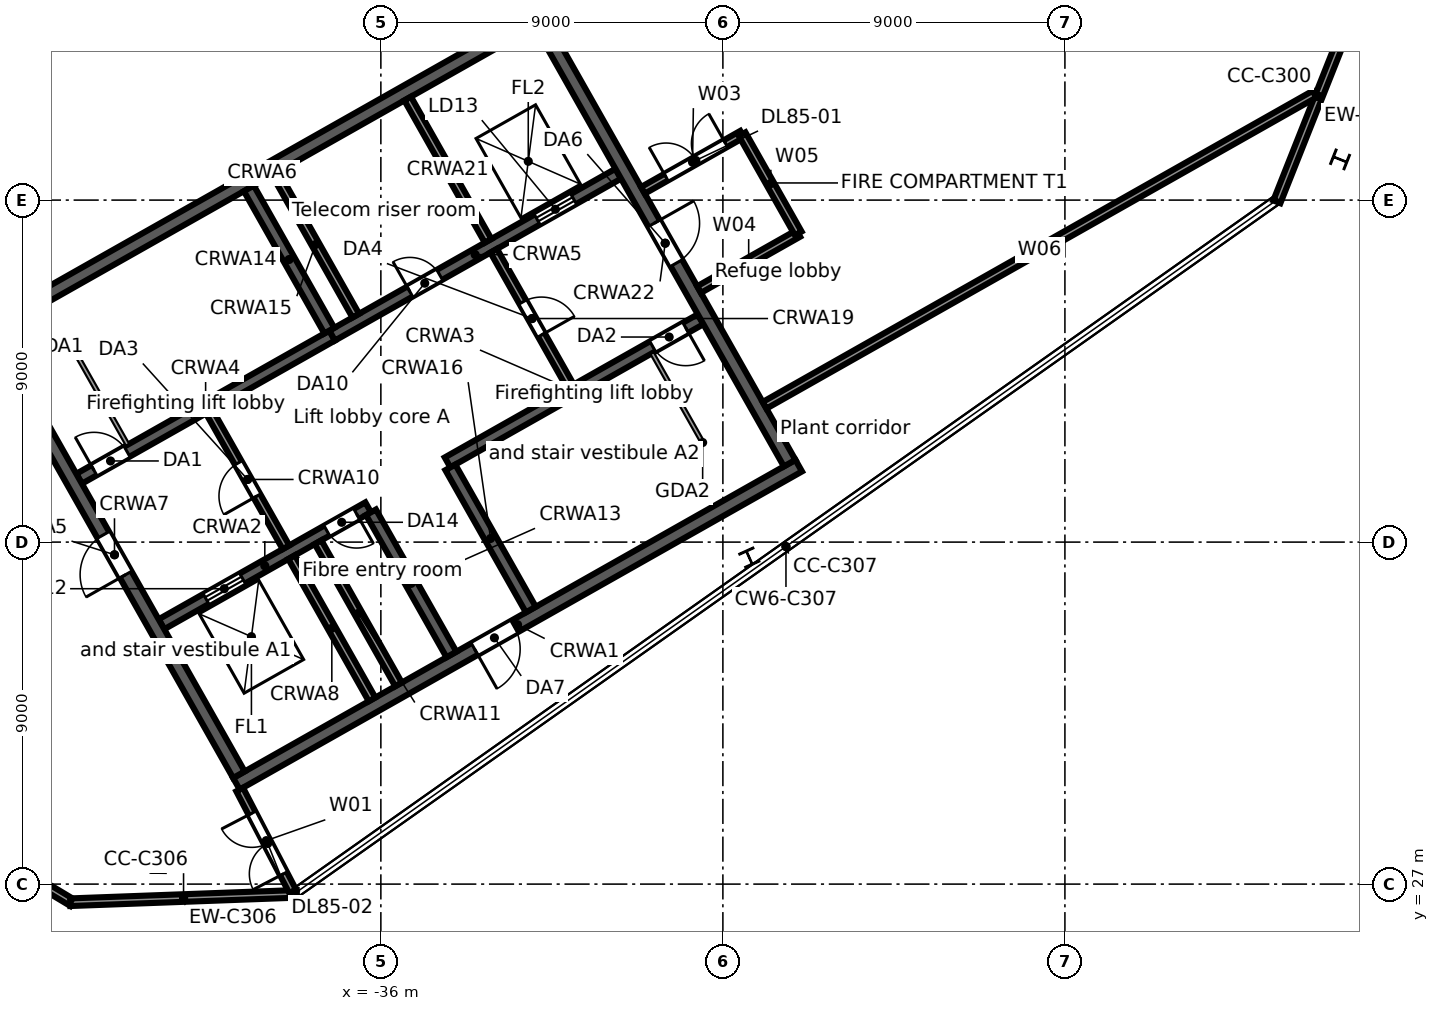
"""IFC4 building model, lengths in metres.
Left out: names, types, materials, properties, quantities, classifications, styles, units other than length and angle.
Written with IfcOpenShell. Run it as: python <this file> out.ifc"""

import sys

from ifc_helpers import new_model, si_unit, direction, frame, frame_2d, origin, origin_2d, place, context, subcontext, project, spatial, rectangle, i_section, extrude, element, fill, save


model = new_model("IFC4")
c1 = context("Model", 3, precision=1e-05, world=origin(), true_north=direction((0.0, 1.0)))
c2 = subcontext(c1, "Body", "Model", "MODEL_VIEW")
j1 = project(units=[si_unit("LENGTHUNIT", "METRE"), si_unit("PLANEANGLEUNIT", "RADIAN")], contexts=[c1])
p1 = place(None, origin())
s1 = spatial("IfcSite", under=j1, at=p1, CompositionType="ELEMENT")
p2 = place(p1, origin())
s2 = spatial("IfcBuilding", under=s1, at=p2, CompositionType="ELEMENT")
p3 = place(p2, frame((0.0, 0.0, 368.5)))
s3 = spatial("IfcBuildingStorey", under=s2, at=p3, CompositionType="ELEMENT", Elevation=368.5)
for number, where, z_axis, x_axis in (
    (1, (-41.858, 27.495, 0.0), (0.0, 0.0, 1.0), (1.0, -0.013, 0.0)),
    (2, (-10.76, 46.071, 0.0), (0.0, 0.0, 1.0), (0.369, 0.929, 0.0)),
    (3, (-26.305, 35.591, 0.0), (0.0, 0.0, 1.0), (0.911, 0.413, 0.0)),
):
    element("IfcColumn", number, at=place(p3, frame(where, z_axis=z_axis, x_axis=x_axis)), inside=s3, PredefinedType="COLUMN", context=c2, shape_type="SweptSolid", body=[
        extrude(i_section(OverallWidth=0.4, OverallDepth=0.4, WebThickness=0.013, FlangeThickness=0.021, FilletRadius=0.022, at=origin_2d()), origin(), (0.0, 0.0, 1.0), 3.3),
    ])
p4 = place(p3, frame((-10.22, 50.501, 0.0), z_axis=(0.0, 0.0, 1.0), x_axis=(-0.369026712049, -0.929418789241, 0.0)))
e4 = element("IfcWall", 4, at=p4, inside=s3, PredefinedType="STANDARD", context=c2, shape_type="SweptSolid", body=[
    extrude(rectangle(XDim=5.968, YDim=0.2, at=frame_2d((2.984, 0.0))), origin(), (0.0, 0.0, 1.0), 2.85),
])
p5 = place(p3, frame((-44.119, 26.509, 0.0), z_axis=(0.0, 0.0, 1.0), x_axis=(-0.857168693653, 0.515035756644, 0.0)))
e5 = element("IfcWall", 5, at=p5, inside=s3, PredefinedType="STANDARD", context=c2, shape_type="SweptSolid", body=[
    extrude(rectangle(XDim=17.084, YDim=0.2, at=frame_2d((8.542, 0.0))), origin(), (0.0, 0.0, 1.0), 3.6),
])
p6 = place(p3, frame((-38.21, 26.744, 0.0), z_axis=(0.0, 0.0, 1.0), x_axis=(-0.999319030106, -0.036898185155, 0.0)))
e6 = element("IfcWall", 6, at=p6, inside=s3, PredefinedType="STANDARD", context=c2, shape_type="SweptSolid", body=[
    extrude(rectangle(XDim=5.968, YDim=0.2, at=frame_2d((2.984, 0.0))), origin(), (0.0, 0.0, 1.0), 3.6),
])
p7 = place(p3, frame((-39.801, 29.64, 0.0), z_axis=(0.0, 0.0, 1.0), x_axis=(0.870359753402, 0.492416388494, 0.0)))
e7 = element("IfcWall", 7, at=p7, inside=s3, PredefinedType="SOLIDWALL", context=c2, shape_type="SweptSolid", body=[
    extrude(rectangle(XDim=17.0, YDim=0.35, at=frame_2d((8.5, 0.0))), origin(), (0.0, 0.0, 1.0), 3.3),
])
p8 = place(p7, frame((7.2, 0.0, 0.0)))
e8 = element("IfcOpeningElement", 8, at=p8, cuts=e7, PredefinedType="OPENING", context=c2, shape_type="SweptSolid", body=[
    extrude(rectangle(XDim=1.2, YDim=2.1, at=frame_2d((0.6, 1.05))), frame((0.0, 0.185, 0.0), z_axis=(0.0, -1.0, 0.0), x_axis=(1.0, 0.0, 0.0)), (0.0, 0.0, 1.0), 0.37),
])
p9 = place(p3, frame((-41.774, 33.838, 0.0), z_axis=(0.0, 0.0, 1.0), x_axis=(0.870355415866, 0.492424055132, 0.0)))
e9 = element("IfcWall", 9, at=p9, inside=s3, PredefinedType="SOLIDWALL", context=c2, shape_type="SweptSolid", body=[
    extrude(rectangle(XDim=6.25, YDim=0.3, at=frame_2d((3.125, 0.0))), origin(), (0.0, 0.0, 1.0), 3.3),
])
p10 = place(p9, frame((1.35, 0.0, 0.0)))
e10 = element("IfcOpeningElement", 10, at=p10, cuts=e9, PredefinedType="OPENING", context=c2, shape_type="SweptSolid", body=[
    extrude(rectangle(XDim=1.1, YDim=2.1, at=frame_2d((0.55, 1.05))), frame((0.0, 0.16, 0.0), z_axis=(0.0, -1.0, 0.0), x_axis=(1.0, 0.0, 0.0)), (0.0, 0.0, 1.0), 0.32),
])
p11 = place(p9, frame((5.0, 0.0, 0.0)))
e11 = element("IfcOpeningElement", 11, at=p11, cuts=e9, PredefinedType="OPENING", context=c2, shape_type="SweptSolid", body=[
    extrude(rectangle(XDim=0.9, YDim=2.1, at=frame_2d((0.45, 1.05))), frame((0.0, 0.16, 0.0), z_axis=(0.0, -1.0, 0.0), x_axis=(1.0, 0.0, 0.0)), (0.0, 0.0, 1.0), 0.32),
])
p12 = place(p3, frame((-34.245, 38.097, 0.0), z_axis=(0.0, 0.0, 1.0), x_axis=(0.870352347706, 0.49242947804, 0.0)))
e12 = element("IfcWall", 12, at=p12, inside=s3, PredefinedType="SOLIDWALL", context=c2, shape_type="SweptSolid", body=[
    extrude(rectangle(XDim=7.65, YDim=0.3, at=frame_2d((3.825, 0.0))), origin(), (0.0, 0.0, 1.0), 3.3),
])
p13 = place(p12, frame((6.2, 0.0, 0.0)))
e13 = element("IfcOpeningElement", 13, at=p13, cuts=e12, PredefinedType="OPENING", context=c2, shape_type="SweptSolid", body=[
    extrude(rectangle(XDim=1.0, YDim=2.1, at=frame_2d((0.5, 1.05))), frame((0.0, 0.16, 0.0), z_axis=(0.0, -1.0, 0.0), x_axis=(1.0, 0.0, 0.0)), (0.0, 0.0, 1.0), 0.32),
])
p14 = place(p3, frame((-43.94, 37.667, 0.0), z_axis=(0.0, 0.0, 1.0), x_axis=(0.870352347706, 0.49242947804, 0.0)))
e14 = element("IfcWall", 14, at=p14, inside=s3, PredefinedType="SOLIDWALL", context=c2, shape_type="SweptSolid", body=[
    extrude(rectangle(XDim=7.65, YDim=0.3, at=frame_2d((3.825, 0.0))), origin(), (0.0, 0.0, 1.0), 3.3),
])
p15 = place(p14, frame((0.45, 0.0, 0.0)))
e15 = element("IfcOpeningElement", 15, at=p15, cuts=e14, PredefinedType="OPENING", context=c2, shape_type="SweptSolid", body=[
    extrude(rectangle(XDim=1.0, YDim=2.1, at=frame_2d((0.5, 1.05))), frame((0.0, 0.16, 0.0), z_axis=(0.0, -1.0, 0.0), x_axis=(1.0, 0.0, 0.0)), (0.0, 0.0, 1.0), 0.32),
])
p16 = place(p3, frame((-37.282, 41.435, 0.0), z_axis=(0.0, 0.0, 1.0), x_axis=(0.870364588774, 0.492407841741, 0.0)))
e16 = element("IfcWall", 16, at=p16, inside=s3, PredefinedType="SOLIDWALL", context=c2, shape_type="SweptSolid", body=[
    extrude(rectangle(XDim=8.65, YDim=0.3, at=frame_2d((4.325, 0.0))), origin(), (0.0, 0.0, 1.0), 3.3),
])
p17 = place(p16, frame((6.2, 0.0, 0.0)))
e17 = element("IfcOpeningElement", 17, at=p17, cuts=e16, PredefinedType="OPENING", context=c2, shape_type="SweptSolid", body=[
    extrude(rectangle(XDim=1.1, YDim=2.1, at=frame_2d((0.55, 1.05))), frame((0.0, 0.16, 0.0), z_axis=(0.0, -1.0, 0.0), x_axis=(1.0, 0.0, 0.0)), (0.0, 0.0, 1.0), 0.32),
])
p18 = place(p16, frame((2.35, 0.0, 0.0)))
e18 = element("IfcOpeningElement", 18, at=p18, cuts=e16, PredefinedType="OPENING", context=c2, shape_type="SweptSolid", body=[
    extrude(rectangle(XDim=0.9, YDim=2.1, at=frame_2d((0.45, 1.05))), frame((0.0, 0.16, 0.0), z_axis=(0.0, -1.0, 0.0), x_axis=(1.0, 0.0, 0.0)), (0.0, 0.0, 1.0), 0.32),
])
p19 = place(p3, frame((-46.522, 41.521, 0.0), z_axis=(0.0, 0.0, 1.0), x_axis=(0.870359753402, 0.492416388494, 0.0)))
e19 = element("IfcWall", 19, at=p19, inside=s3, PredefinedType="SOLIDWALL", context=c2, shape_type="SweptSolid", body=[
    extrude(rectangle(XDim=17.0, YDim=0.35, at=frame_2d((8.5, 0.0))), origin(), (0.0, 0.0, 1.0), 3.3),
])
p20 = place(p3, frame((-46.284, 41.454, 0.0), z_axis=(0.0, 0.0, 1.0), x_axis=(0.492429810477, -0.870352159619, 0.0)))
e20 = element("IfcWall", 20, at=p20, inside=s3, PredefinedType="SOLIDWALL", context=c2, shape_type="SweptSolid", body=[
    extrude(rectangle(XDim=13.3, YDim=0.35, at=frame_2d((6.65, 0.0))), origin(), (0.0, 0.0, 1.0), 3.3),
])
p21 = place(p20, frame((6.05, 0.0, 0.0)))
e21 = element("IfcOpeningElement", 21, at=p21, cuts=e20, PredefinedType="OPENING", context=c2, shape_type="SweptSolid", body=[
    extrude(rectangle(XDim=1.2, YDim=2.1, at=frame_2d((0.6, 1.05))), frame((0.0, 0.185, 0.0), z_axis=(0.0, -1.0, 0.0), x_axis=(1.0, 0.0, 0.0)), (0.0, 0.0, 1.0), 0.37),
])
p22 = place(p3, frame((-38.349, 35.603, 0.0), z_axis=(0.0, 0.0, 1.0), x_axis=(0.492410799949, -0.870362915164, 0.0)))
e22 = element("IfcWall", 22, at=p22, inside=s3, PredefinedType="SOLIDWALL", context=c2, shape_type="SweptSolid", body=[
    extrude(rectangle(XDim=4.3, YDim=0.2, at=frame_2d((2.15, 0.0))), origin(), (0.0, 0.0, 1.0), 3.3),
])
p23 = place(p3, frame((-40.516, 39.433, 0.0), z_axis=(0.0, 0.0, 1.0), x_axis=(0.492453559952, -0.87033872216, 0.0)))
e23 = element("IfcWall", 23, at=p23, inside=s3, PredefinedType="PARTITIONING", context=c2, shape_type="SweptSolid", body=[
    extrude(rectangle(XDim=4.1, YDim=0.2, at=frame_2d((2.05, 0.0))), origin(), (0.0, 0.0, 1.0), 3.3),
])
p24 = place(p23, frame((1.55, 0.0, 0.0)))
e24 = element("IfcOpeningElement", 24, at=p24, cuts=e23, PredefinedType="OPENING", context=c2, shape_type="SweptSolid", body=[
    extrude(rectangle(XDim=1.0, YDim=2.1, at=frame_2d((0.5, 1.05))), frame((0.0, 0.11, 0.0), z_axis=(0.0, -1.0, 0.0), x_axis=(1.0, 0.0, 0.0)), (0.0, 0.0, 1.0), 0.22),
])
p25 = place(p3, frame((-37.653, 35.997, 0.0), z_axis=(0.0, 0.0, 1.0), x_axis=(0.492435133428, -0.870349147967, 0.0)))
e25 = element("IfcWall", 25, at=p25, inside=s3, PredefinedType="SOLIDWALL", context=c2, shape_type="SweptSolid", body=[
    extrude(rectangle(XDim=4.3, YDim=0.2, at=frame_2d((2.15, 0.0))), origin(), (0.0, 0.0, 1.0), 3.3),
])
p26 = place(p3, frame((-36.26, 36.785, 0.0), z_axis=(0.0, 0.0, 1.0), x_axis=(0.492435133428, -0.870349147967, 0.0)))
e26 = element("IfcWall", 26, at=p26, inside=s3, PredefinedType="SOLIDWALL", context=c2, shape_type="SweptSolid", body=[
    extrude(rectangle(XDim=4.3, YDim=0.3, at=frame_2d((2.15, 0.0))), origin(), (0.0, 0.0, 1.0), 3.3),
])
p27 = place(p3, frame((-39.473, 45.308, 0.0), z_axis=(0.0, 0.0, 1.0), x_axis=(0.492410799949, -0.870362915164, 0.0)))
e27 = element("IfcWall", 27, at=p27, inside=s3, PredefinedType="SOLIDWALL", context=c2, shape_type="SweptSolid", body=[
    extrude(rectangle(XDim=4.3, YDim=0.3, at=frame_2d((2.15, 0.0))), origin(), (0.0, 0.0, 1.0), 3.3),
])
p28 = place(p3, frame((-38.777, 45.701, 0.0), z_axis=(0.0, 0.0, 1.0), x_axis=(0.492435133428, -0.870349147967, 0.0)))
e28 = element("IfcWall", 28, at=p28, inside=s3, PredefinedType="SOLIDWALL", context=c2, shape_type="SweptSolid", body=[
    extrude(rectangle(XDim=4.3, YDim=0.2, at=frame_2d((2.15, 0.0))), origin(), (0.0, 0.0, 1.0), 3.3),
])
p29 = place(p3, frame((-34.171, 37.967, 0.0), z_axis=(0.0, 0.0, 1.0), x_axis=(0.492435133428, -0.870349147967, 0.0)))
e29 = element("IfcWall", 29, at=p29, inside=s3, PredefinedType="SOLIDWALL", context=c2, shape_type="SweptSolid", body=[
    extrude(rectangle(XDim=4.3, YDim=0.3, at=frame_2d((2.15, 0.0))), origin(), (0.0, 0.0, 1.0), 3.3),
])
p30 = place(p3, frame((-33.031, 43.667, 0.0), z_axis=(0.0, 0.0, 1.0), x_axis=(0.492408451753, -0.87036424366, 0.0)))
e30 = element("IfcWall", 30, at=p30, inside=s3, PredefinedType="PARTITIONING", context=c2, shape_type="SweptSolid", body=[
    extrude(rectangle(XDim=4.1, YDim=0.2, at=frame_2d((2.05, 0.0))), origin(), (0.0, 0.0, 1.0), 3.3),
])
p31 = place(p30, frame((1.55, 0.0, 0.0)))
e31 = element("IfcOpeningElement", 31, at=p31, cuts=e30, PredefinedType="OPENING", context=c2, shape_type="SweptSolid", body=[
    extrude(rectangle(XDim=1.0, YDim=2.1, at=frame_2d((0.5, 1.05))), frame((0.0, 0.11, 0.0), z_axis=(0.0, -1.0, 0.0), x_axis=(1.0, 0.0, 0.0)), (0.0, 0.0, 1.0), 0.22),
])
p32 = place(p3, frame((-35.296, 47.671, 0.0), z_axis=(0.0, 0.0, 1.0), x_axis=(0.492435133428, -0.870349147967, 0.0)))
e32 = element("IfcWall", 32, at=p32, inside=s3, PredefinedType="SOLIDWALL", context=c2, shape_type="SweptSolid", body=[
    extrude(rectangle(XDim=4.3, YDim=0.2, at=frame_2d((2.15, 0.0))), origin(), (0.0, 0.0, 1.0), 3.3),
])
p33 = place(p3, frame((-31.792, 49.653, 0.0), z_axis=(0.0, 0.0, 1.0), x_axis=(0.492421943245, -0.870356610712, 0.0)))
e33 = element("IfcWall", 33, at=p33, inside=s3, PredefinedType="SOLIDWALL", context=c2, shape_type="SweptSolid", body=[
    extrude(rectangle(XDim=13.3, YDim=0.35, at=frame_2d((6.65, 0.0))), origin(), (0.0, 0.0, 1.0), 3.3),
])
p34 = place(p33, frame((6.05, 0.0, 0.0)))
e34 = element("IfcOpeningElement", 34, at=p34, cuts=e33, PredefinedType="OPENING", context=c2, shape_type="SweptSolid", body=[
    extrude(rectangle(XDim=1.2, YDim=2.1, at=frame_2d((0.6, 1.05))), frame((0.0, 0.185, 0.0), z_axis=(0.0, -1.0, 0.0), x_axis=(1.0, 0.0, 0.0)), (0.0, 0.0, 1.0), 0.37),
])
p35 = place(p3, frame((-39.715, 29.488, 0.0), z_axis=(0.0, 0.0, 1.0), x_axis=(0.461720517785, -0.887025458178, 0.0)))
e35 = element("IfcWall", 35, at=p35, inside=s3, PredefinedType="PARTITIONING", context=c2, shape_type="SweptSolid", body=[
    extrude(rectangle(XDim=3.03, YDim=0.2, at=frame_2d((1.515, 0.0))), origin(), (0.0, 0.0, 1.0), 3.3),
])
p36 = place(p35, frame((0.7, 0.0, 0.0)))
e36 = element("IfcOpeningElement", 36, at=p36, cuts=e35, PredefinedType="OPENING", context=c2, shape_type="SweptSolid", body=[
    extrude(rectangle(XDim=1.8, YDim=2.1, at=frame_2d((0.9, 1.05))), frame((0.0, 0.11, 0.0), z_axis=(0.0, -1.0, 0.0), x_axis=(1.0, 0.0, 0.0)), (0.0, 0.0, 1.0), 0.22),
])
p37 = place(p3, frame((-29.104, 45.257, 0.0), z_axis=(0.0, 0.0, 1.0), x_axis=(0.870423351516, 0.492303960105, 0.0)))
e37 = element("IfcWall", 37, at=p37, inside=s3, PredefinedType="PARTITIONING", context=c2, shape_type="SweptSolid", body=[
    extrude(rectangle(XDim=3.0, YDim=0.2, at=frame_2d((1.5, 0.0))), origin(), (0.0, 0.0, 1.0), 3.3),
])
p38 = place(p37, frame((0.7, 0.0, 0.0)))
e38 = element("IfcOpeningElement", 38, at=p38, cuts=e37, PredefinedType="OPENING", context=c2, shape_type="SweptSolid", body=[
    extrude(rectangle(XDim=1.8, YDim=2.1, at=frame_2d((0.9, 1.05))), frame((0.0, 0.11, 0.0), z_axis=(0.0, -1.0, 0.0), x_axis=(1.0, 0.0, 0.0)), (0.0, 0.0, 1.0), 0.22),
])
p39 = place(p3, frame((-27.627, 42.646, 0.0), z_axis=(0.0, 0.0, 1.0), x_axis=(0.870368744559, 0.492400496034, 0.0)))
e39 = element("IfcWall", 39, at=p39, inside=s3, PredefinedType="PARTITIONING", context=c2, shape_type="SweptSolid", body=[
    extrude(rectangle(XDim=3.0, YDim=0.2, at=frame_2d((1.5, 0.0))), origin(), (0.0, 0.0, 1.0), 3.3),
])
p40 = place(p3, frame((-26.493, 46.734, 0.0), z_axis=(0.0, 0.0, 1.0), x_axis=(0.492338837132, -0.870403624448, 0.0)))
e40 = element("IfcWall", 40, at=p40, inside=s3, PredefinedType="PARTITIONING", context=c2, shape_type="SweptSolid", body=[
    extrude(rectangle(XDim=3.0, YDim=0.2, at=frame_2d((1.5, 0.0))), origin(), (0.0, 0.0, 1.0), 3.3),
])
p41 = place(p3, frame((-25.904, 39.6, 0.0), z_axis=(0.0, 0.0, 1.0), x_axis=(0.870362303086, 0.49241188183, 0.0)))
e41 = element("IfcWall", 41, at=p41, inside=s3, PredefinedType="PARTITIONING", context=c2, shape_type="SweptSolid", body=[
    extrude(rectangle(XDim=16.626, YDim=0.2, at=frame_2d((8.313, 0.0))), origin(), (0.0, 0.0, 1.0), 3.3),
])
p42 = place(p17, origin())
e42 = element("IfcDoor", 42, at=p42, inside=s3, OperationType="DOUBLE_DOOR_SLIDING", PredefinedType="DOOR", context=c2, shape_type="SweptSolid", body=[
    extrude(rectangle(XDim=1.1, YDim=2.1, at=frame_2d((0.55, 1.05))), frame((0.0, 0.025, 0.0), z_axis=(0.0, -1.0, 0.0), x_axis=(1.0, 0.0, 0.0)), (0.0, 0.0, 1.0), 0.05),
])
fill(e17, e42)
p43 = place(p10, origin())
e43 = element("IfcDoor", 43, at=p43, inside=s3, OperationType="DOUBLE_DOOR_SLIDING", PredefinedType="DOOR", context=c2, shape_type="SweptSolid", body=[
    extrude(rectangle(XDim=1.1, YDim=2.1, at=frame_2d((0.55, 1.05))), frame((0.0, 0.025, 0.0), z_axis=(0.0, -1.0, 0.0), x_axis=(1.0, 0.0, 0.0)), (0.0, 0.0, 1.0), 0.05),
])
fill(e10, e43)
p44 = place(p15, origin())
e44 = element("IfcDoor", 44, at=p44, inside=s3, OperationType="SINGLE_SWING_LEFT", PredefinedType="DOOR", context=c2, shape_type="SweptSolid", body=[
    extrude(rectangle(XDim=1.0, YDim=2.1, at=frame_2d((0.5, 1.05))), frame((0.0, 0.025, 0.0), z_axis=(0.0, -1.0, 0.0), x_axis=(1.0, 0.0, 0.0)), (0.0, 0.0, 1.0), 0.05),
])
fill(e15, e44)
p45 = place(p13, frame((1.0, 0.0, 0.0), z_axis=(0.0, 0.0, 1.0), x_axis=(-1.0, 0.0, 0.0)))
e45 = element("IfcDoor", 45, at=p45, inside=s3, OperationType="SINGLE_SWING_LEFT", PredefinedType="DOOR", context=c2, shape_type="SweptSolid", body=[
    extrude(rectangle(XDim=1.0, YDim=2.1, at=frame_2d((0.5, 1.05))), frame((0.0, 0.025, 0.0), z_axis=(0.0, -1.0, 0.0), x_axis=(1.0, 0.0, 0.0)), (0.0, 0.0, 1.0), 0.05),
])
fill(e13, e45)
p46 = place(p24, frame((1.0, 0.0, 0.0), z_axis=(0.0, 0.0, 1.0), x_axis=(-1.0, 0.0, 0.0)))
e46 = element("IfcDoor", 46, at=p46, inside=s3, OperationType="SINGLE_SWING_LEFT", PredefinedType="DOOR", context=c2, shape_type="SweptSolid", body=[
    extrude(rectangle(XDim=1.0, YDim=2.1, at=frame_2d((0.5, 1.05))), frame((0.0, 0.025, 0.0), z_axis=(0.0, -1.0, 0.0), x_axis=(1.0, 0.0, 0.0)), (0.0, 0.0, 1.0), 0.05),
])
fill(e24, e46)
p47 = place(p21, frame((1.2, 0.0, 0.0), z_axis=(0.0, 0.0, 1.0), x_axis=(-1.0, 0.0, 0.0)))
e47 = element("IfcDoor", 47, at=p47, inside=s3, OperationType="SINGLE_SWING_LEFT", PredefinedType="DOOR", context=c2, shape_type="SweptSolid", body=[
    extrude(rectangle(XDim=1.2, YDim=2.1, at=frame_2d((0.6, 1.05))), frame((0.0, 0.025, 0.0), z_axis=(0.0, -1.0, 0.0), x_axis=(1.0, 0.0, 0.0)), (0.0, 0.0, 1.0), 0.05),
])
fill(e21, e47)
p48 = place(p31, origin())
e48 = element("IfcDoor", 48, at=p48, inside=s3, OperationType="SINGLE_SWING_RIGHT", PredefinedType="DOOR", context=c2, shape_type="SweptSolid", body=[
    extrude(rectangle(XDim=1.0, YDim=2.1, at=frame_2d((0.5, 1.05))), frame((0.0, 0.025, 0.0), z_axis=(0.0, -1.0, 0.0), x_axis=(1.0, 0.0, 0.0)), (0.0, 0.0, 1.0), 0.05),
])
fill(e31, e48)
p49 = place(p34, origin())
e49 = element("IfcDoor", 49, at=p49, inside=s3, OperationType="SINGLE_SWING_LEFT", PredefinedType="DOOR", context=c2, shape_type="SweptSolid", body=[
    extrude(rectangle(XDim=1.2, YDim=2.1, at=frame_2d((0.6, 1.05))), frame((0.0, 0.025, 0.0), z_axis=(0.0, -1.0, 0.0), x_axis=(1.0, 0.0, 0.0)), (0.0, 0.0, 1.0), 0.05),
])
fill(e34, e49)
p50 = place(p8, frame((1.2, 0.0, 0.0), z_axis=(0.0, 0.0, 1.0), x_axis=(-1.0, 0.0, 0.0)))
e50 = element("IfcDoor", 50, at=p50, inside=s3, OperationType="SINGLE_SWING_RIGHT", PredefinedType="DOOR", context=c2, shape_type="SweptSolid", body=[
    extrude(rectangle(XDim=1.2, YDim=2.1, at=frame_2d((0.6, 1.05))), frame((0.0, 0.025, 0.0), z_axis=(0.0, -1.0, 0.0), x_axis=(1.0, 0.0, 0.0)), (0.0, 0.0, 1.0), 0.05),
])
fill(e8, e50)
p51 = place(p18, origin())
e51 = element("IfcDoor", 51, at=p51, inside=s3, OperationType="SINGLE_SWING_LEFT", PredefinedType="DOOR", context=c2, shape_type="SweptSolid", body=[
    extrude(rectangle(XDim=0.9, YDim=2.1, at=frame_2d((0.45, 1.05))), frame((0.0, 0.025, 0.0), z_axis=(0.0, -1.0, 0.0), x_axis=(1.0, 0.0, 0.0)), (0.0, 0.0, 1.0), 0.05),
])
fill(e18, e51)
p52 = place(p11, frame((0.9, 0.0, 0.0), z_axis=(0.0, 0.0, 1.0), x_axis=(-1.0, 0.0, 0.0)))
e52 = element("IfcDoor", 52, at=p52, inside=s3, OperationType="SINGLE_SWING_LEFT", PredefinedType="DOOR", context=c2, shape_type="SweptSolid", body=[
    extrude(rectangle(XDim=0.9, YDim=2.1, at=frame_2d((0.45, 1.05))), frame((0.0, 0.025, 0.0), z_axis=(0.0, -1.0, 0.0), x_axis=(1.0, 0.0, 0.0)), (0.0, 0.0, 1.0), 0.05),
])
fill(e11, e52)
p53 = place(p38, origin())
e53 = element("IfcDoor", 53, at=p53, inside=s3, OperationType="DOUBLE_DOOR_SINGLE_SWING", PredefinedType="DOOR", context=c2, shape_type="SweptSolid", body=[
    extrude(rectangle(XDim=1.8, YDim=2.1, at=frame_2d((0.9, 1.05))), frame((0.0, 0.025, 0.0), z_axis=(0.0, -1.0, 0.0), x_axis=(1.0, 0.0, 0.0)), (0.0, 0.0, 1.0), 0.05),
])
fill(e38, e53)
p54 = place(p36, frame((1.8, 0.0, 0.0), z_axis=(0.0, 0.0, 1.0), x_axis=(-1.0, 0.0, 0.0)))
e54 = element("IfcDoor", 54, at=p54, inside=s3, OperationType="DOUBLE_DOOR_SINGLE_SWING", PredefinedType="DOOR", context=c2, shape_type="SweptSolid", body=[
    extrude(rectangle(XDim=1.8, YDim=2.1, at=frame_2d((0.9, 1.05))), frame((0.0, 0.025, 0.0), z_axis=(0.0, -1.0, 0.0), x_axis=(1.0, 0.0, 0.0)), (0.0, 0.0, 1.0), 0.05),
])
fill(e36, e54)
save(model, sys.argv[1])
